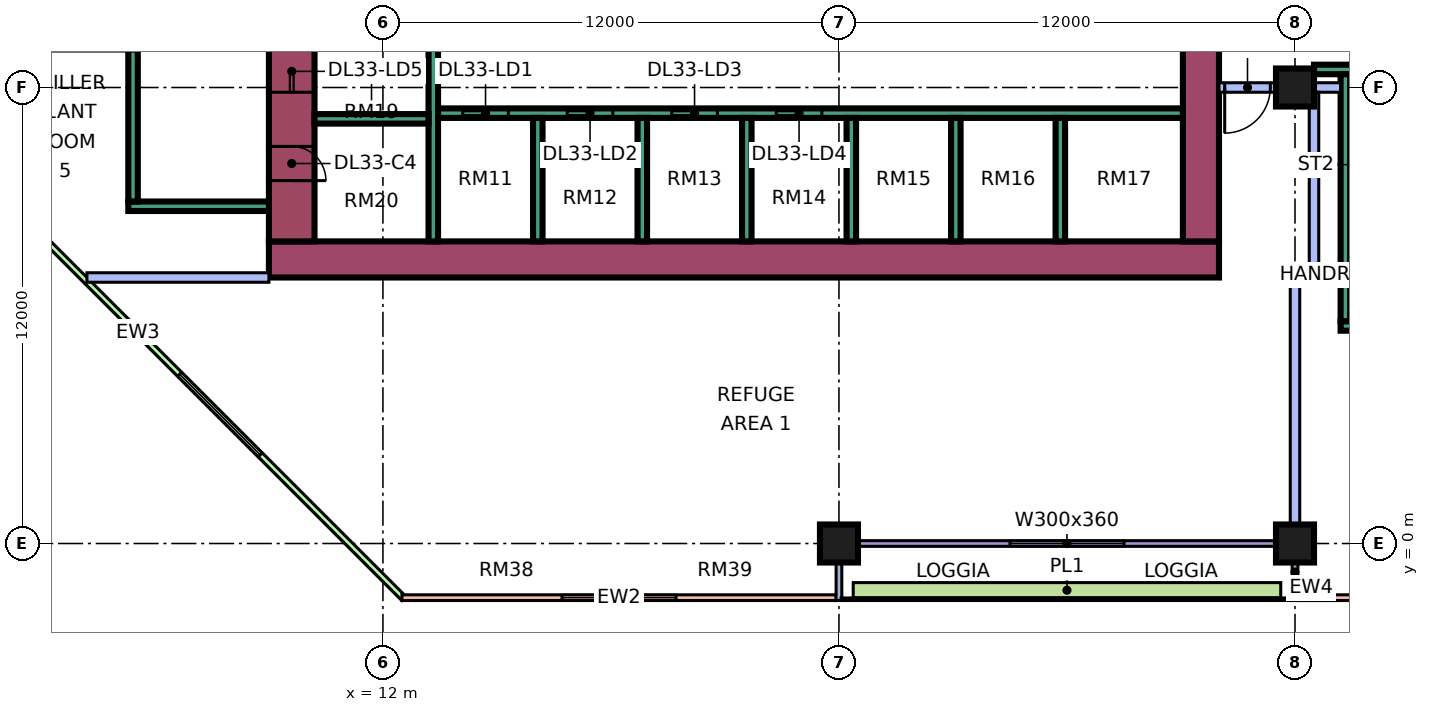
"""IFC4 building model, lengths in metres.
Left out: names, types, materials, properties, quantities, classifications, styles, units other than length and angle.
Written with IfcOpenShell. Run it as: python <this file> out.ifc"""

import sys

from ifc_helpers import new_model, si_unit, direction, frame, frame_2d, origin, origin_2d, place, context, subcontext, project, spatial, rectangle, extrude, element, fill, save


model = new_model("IFC4")
c1 = context("Model", 3, precision=1e-05, world=origin(), true_north=direction((0.0, 1.0)))
c2 = subcontext(c1, "Body", "Model", "MODEL_VIEW")
j1 = project(units=[si_unit("LENGTHUNIT", "METRE"), si_unit("PLANEANGLEUNIT", "RADIAN")], contexts=[c1])
p1 = place(None, origin())
s1 = spatial("IfcSite", under=j1, at=p1, CompositionType="ELEMENT")
p2 = place(p1, origin())
s2 = spatial("IfcBuilding", under=s1, at=p2, CompositionType="ELEMENT")
p3 = place(p2, frame((0.0, 0.0, 140.65)))
s3 = spatial("IfcBuildingStorey", under=s2, at=p3, CompositionType="ELEMENT", Elevation=140.65)
for number, where, z_axis, x_axis in (
    (1, (24.0, 0.0, 0.0), (0.0, 0.0, 1.0), (1.0, 0.0, 0.0)),
    (2, (36.0, 0.0, 0.0), (0.0, 0.0, 1.0), (1.0, 0.0, 0.0)),
    (3, (36.0, 12.0, 0.0), (0.0, 0.0, 1.0), (1.0, 0.0, 0.0)),
):
    element("IfcColumn", number, at=place(p3, frame(where, z_axis=z_axis, x_axis=x_axis)), inside=s3, PredefinedType="COLUMN", context=c2, shape_type="SweptSolid", body=[
        extrude(rectangle(XDim=1.0, YDim=1.0, at=origin_2d()), origin(), (0.0, 0.0, 1.0), 5.5),
    ])
p4 = place(p3, frame((9.0, 7.475, 0.0), z_axis=(0.0, 0.0, 1.0), x_axis=(1.0, 0.0, 0.0)))
e4 = element("IfcWall", 4, at=p4, inside=s3, PredefinedType="SHEAR", context=c2, shape_type="SweptSolid", body=[
    extrude(rectangle(XDim=25.0, YDim=0.95, at=frame_2d((12.5, 0.0))), origin(), (0.0, 0.0, 1.0), 5.5),
])
p5 = place(p3, frame((9.6, 7.95, 0.0), z_axis=(0.0, 0.0, 1.0), x_axis=(0.0, 1.0, 0.0)))
e5 = element("IfcWall", 5, at=p5, inside=s3, PredefinedType="SHEAR", context=c2, shape_type="SweptSolid", body=[
    extrude(rectangle(XDim=11.1, YDim=1.2, at=frame_2d((5.55, 0.0))), origin(), (0.0, 0.0, 1.0), 5.5),
])
p6 = place(p5, frame((3.925, 0.0, 0.0)))
e6 = element("IfcOpeningElement", 6, at=p6, cuts=e5, PredefinedType="OPENING", context=c2, shape_type="SweptSolid", body=[
    extrude(rectangle(XDim=1.1, YDim=2.2, at=frame_2d((0.55, 1.1))), frame((0.0, 0.61, 0.0), z_axis=(0.0, -1.0, 0.0), x_axis=(1.0, 0.0, 0.0)), (0.0, 0.0, 1.0), 1.22),
])
p7 = place(p5, frame((6.425, 0.0, 0.0)))
e7 = element("IfcOpeningElement", 7, at=p7, cuts=e5, PredefinedType="OPENING", context=c2, shape_type="SweptSolid", body=[
    extrude(rectangle(XDim=1.1, YDim=2.2, at=frame_2d((0.55, 1.1))), frame((0.0, 0.61, 0.0), z_axis=(0.0, -1.0, 0.0), x_axis=(1.0, 0.0, 0.0)), (0.0, 0.0, 1.0), 1.22),
])
p8 = place(p5, frame((9.175, 0.0, 0.0)))
e8 = element("IfcOpeningElement", 8, at=p8, cuts=e5, PredefinedType="OPENING", context=c2, shape_type="SweptSolid", body=[
    extrude(rectangle(XDim=1.1, YDim=2.2, at=frame_2d((0.55, 1.1))), frame((0.0, 0.61, 0.0), z_axis=(0.0, -1.0, 0.0), x_axis=(1.0, 0.0, 0.0)), (0.0, 0.0, 1.0), 1.22),
])
p9 = place(p5, frame((1.6, 0.0, 0.0)))
e9 = element("IfcOpeningElement", 9, at=p9, cuts=e5, PredefinedType="OPENING", context=c2, shape_type="SweptSolid", body=[
    extrude(rectangle(XDim=0.9, YDim=2.1, at=frame_2d((0.45, 1.05))), frame((0.0, 0.61, 0.0), z_axis=(0.0, -1.0, 0.0), x_axis=(1.0, 0.0, 0.0)), (0.0, 0.0, 1.0), 1.22),
])
p10 = place(p3, frame((33.525, 7.95, 0.0), z_axis=(0.0, 0.0, 1.0), x_axis=(0.0, 1.0, 0.0)))
e10 = element("IfcWall", 10, at=p10, inside=s3, PredefinedType="SHEAR", context=c2, shape_type="SweptSolid", body=[
    extrude(rectangle(XDim=11.1, YDim=0.95, at=frame_2d((5.55, 0.0))), origin(), (0.0, 0.0, 1.0), 5.5),
])
p11 = place(p10, frame((5.25, 0.0, 0.0)))
e11 = element("IfcOpeningElement", 11, at=p11, cuts=e10, PredefinedType="OPENING", context=c2, shape_type="SweptSolid", body=[
    extrude(rectangle(XDim=1.8, YDim=2.4, at=frame_2d((0.9, 1.2))), frame((0.0, 0.485, 0.0), z_axis=(0.0, -1.0, 0.0), x_axis=(1.0, 0.0, 0.0)), (0.0, 0.0, 1.0), 0.97),
])
p12 = place(p3, frame((13.325, 7.95, 0.0), z_axis=(0.0, 0.0, 1.0), x_axis=(0.0, 1.0, 0.0)))
e12 = element("IfcWall", 12, at=p12, inside=s3, PredefinedType="SHEAR", context=c2, shape_type="SweptSolid", body=[
    extrude(rectangle(XDim=11.1, YDim=0.25, at=frame_2d((5.55, 0.0))), origin(), (0.0, 0.0, 1.0), 5.5),
])
p13 = place(p3, frame((13.45, 11.325, 0.0), z_axis=(0.0, 0.0, 1.0), x_axis=(1.0, 0.0, 0.0)))
e13 = element("IfcWall", 13, at=p13, inside=s3, PredefinedType="SHEAR", context=c2, shape_type="SweptSolid", body=[
    extrude(rectangle(XDim=19.6, YDim=0.25, at=frame_2d((9.8, 0.0))), origin(), (0.0, 0.0, 1.0), 5.5),
])
p14 = place(p13, frame((0.65, 0.0, 0.0)))
e14 = element("IfcOpeningElement", 14, at=p14, cuts=e13, PredefinedType="OPENING", context=c2, shape_type="SweptSolid", body=[
    extrude(rectangle(XDim=1.2, YDim=2.2, at=frame_2d((0.6, 1.1))), frame((0.0, 0.135, 0.0), z_axis=(0.0, -1.0, 0.0), x_axis=(1.0, 0.0, 0.0)), (0.0, 0.0, 1.0), 0.27),
])
p15 = place(p13, frame((3.4, 0.0, 0.0)))
e15 = element("IfcOpeningElement", 15, at=p15, cuts=e13, PredefinedType="OPENING", context=c2, shape_type="SweptSolid", body=[
    extrude(rectangle(XDim=1.2, YDim=2.2, at=frame_2d((0.6, 1.1))), frame((0.0, 0.135, 0.0), z_axis=(0.0, -1.0, 0.0), x_axis=(1.0, 0.0, 0.0)), (0.0, 0.0, 1.0), 0.27),
])
p16 = place(p13, frame((6.15, 0.0, 0.0)))
e16 = element("IfcOpeningElement", 16, at=p16, cuts=e13, PredefinedType="OPENING", context=c2, shape_type="SweptSolid", body=[
    extrude(rectangle(XDim=1.2, YDim=2.2, at=frame_2d((0.6, 1.1))), frame((0.0, 0.135, 0.0), z_axis=(0.0, -1.0, 0.0), x_axis=(1.0, 0.0, 0.0)), (0.0, 0.0, 1.0), 0.27),
])
p17 = place(p13, frame((8.9, 0.0, 0.0)))
e17 = element("IfcOpeningElement", 17, at=p17, cuts=e13, PredefinedType="OPENING", context=c2, shape_type="SweptSolid", body=[
    extrude(rectangle(XDim=1.2, YDim=2.2, at=frame_2d((0.6, 1.1))), frame((0.0, 0.135, 0.0), z_axis=(0.0, -1.0, 0.0), x_axis=(1.0, 0.0, 0.0)), (0.0, 0.0, 1.0), 0.27),
])
p18 = place(p3, frame((10.2, 11.175, 0.0), z_axis=(0.0, 0.0, 1.0), x_axis=(1.0, 0.0, 0.0)))
e18 = element("IfcWall", 18, at=p18, inside=s3, PredefinedType="SHEAR", context=c2, shape_type="SweptSolid", body=[
    extrude(rectangle(XDim=3.0, YDim=0.25, at=frame_2d((1.5, 0.0))), origin(), (0.0, 0.0, 1.0), 5.5),
])
for number, where, z_axis, x_axis in (
    (19, (16.075, 7.95, 0.0), (0.0, 0.0, 1.0), (0.0, 1.0, 0.0)),
    (20, (18.825, 7.95, 0.0), (0.0, 0.0, 1.0), (0.0, 1.0, 0.0)),
    (21, (21.575, 7.95, 0.0), (0.0, 0.0, 1.0), (0.0, 1.0, 0.0)),
    (22, (24.325, 7.95, 0.0), (0.0, 0.0, 1.0), (0.0, 1.0, 0.0)),
    (23, (27.075, 7.95, 0.0), (0.0, 0.0, 1.0), (0.0, 1.0, 0.0)),
    (24, (29.825, 7.95, 0.0), (0.0, 0.0, 1.0), (0.0, 1.0, 0.0)),
):
    element("IfcWall", number, at=place(p3, frame(where, z_axis=z_axis, x_axis=x_axis)), inside=s3, PredefinedType="SHEAR", context=c2, shape_type="SweptSolid", body=[
        extrude(rectangle(XDim=3.25, YDim=0.25, at=frame_2d((1.625, 0.0))), origin(), (0.0, 0.0, 1.0), 5.5),
    ])
p19 = place(p3, frame((5.3, 8.875, 0.0), z_axis=(0.0, 0.0, 1.0), x_axis=(1.0, 0.0, 0.0)))
e25 = element("IfcWall", 25, at=p19, inside=s3, PredefinedType="SHEAR", context=c2, shape_type="SweptSolid", body=[
    extrude(rectangle(XDim=3.7, YDim=0.25, at=frame_2d((1.85, 0.0))), origin(), (0.0, 0.0, 1.0), 5.5),
])
p20 = place(p3, frame((5.425, 9.0, 0.0), z_axis=(0.0, 0.0, 1.0), x_axis=(0.0, 1.0, 0.0)))
e26 = element("IfcWall", 26, at=p20, inside=s3, PredefinedType="SHEAR", context=c2, shape_type="SweptSolid", body=[
    extrude(rectangle(XDim=4.0, YDim=0.25, at=frame_2d((2.0, 0.0))), origin(), (0.0, 0.0, 1.0), 5.5),
])
p21 = place(p3, frame((37.2, 5.725, 0.0), z_axis=(0.0, 0.0, 1.0), x_axis=(1.0, 0.0, 0.0)))
e27 = element("IfcWall", 27, at=p21, inside=s3, PredefinedType="SHEAR", context=c2, shape_type="SweptSolid", body=[
    extrude(rectangle(XDim=3.45, YDim=0.25, at=frame_2d((1.725, 0.0))), origin(), (0.0, 0.0, 1.0), 5.5),
])
p22 = place(p3, frame((36.5, 12.475, 0.0), z_axis=(0.0, 0.0, 1.0), x_axis=(1.0, 0.0, 0.0)))
e28 = element("IfcWall", 28, at=p22, inside=s3, PredefinedType="SHEAR", context=c2, shape_type="SweptSolid", body=[
    extrude(rectangle(XDim=4.15, YDim=0.25, at=frame_2d((2.075, 0.0))), origin(), (0.0, 0.0, 1.0), 5.5),
])
p23 = place(p22, frame((1.875, 0.0, 0.0)))
e29 = element("IfcOpeningElement", 29, at=p23, cuts=e28, PredefinedType="OPENING", context=c2, shape_type="SweptSolid", body=[
    extrude(rectangle(XDim=1.1, YDim=2.2, at=frame_2d((0.55, 1.1))), frame((0.0, 0.135, 0.0), z_axis=(0.0, -1.0, 0.0), x_axis=(1.0, 0.0, 0.0)), (0.0, 0.0, 1.0), 0.27),
])
p24 = place(p3, frame((37.325, 5.85, 0.0), z_axis=(0.0, 0.0, 1.0), x_axis=(0.0, 1.0, 0.0)))
e30 = element("IfcWall", 30, at=p24, inside=s3, PredefinedType="SHEAR", context=c2, shape_type="SweptSolid", body=[
    extrude(rectangle(XDim=6.5, YDim=0.25, at=frame_2d((3.25, 0.0))), origin(), (0.0, 0.0, 1.0), 5.5),
])
p25 = place(p3, frame((-1.447, 12.553, 0.0), z_axis=(0.0, 0.0, 1.0), x_axis=(0.707106781187, -0.707106781187, 0.0)))
e31 = element("IfcWall", 31, at=p25, inside=s3, PredefinedType="SOLIDWALL", context=c2, shape_type="SweptSolid", body=[
    extrude(rectangle(XDim=19.799, YDim=0.15, at=frame_2d((9.899, 0.0))), origin(), (0.0, 0.0, 1.0), 5.05),
])
p26 = place(p25, frame((11.453, 0.0, 0.45)))
e32 = element("IfcOpeningElement", 32, at=p26, cuts=e31, PredefinedType="OPENING", context=c2, shape_type="SweptSolid", body=[
    extrude(rectangle(XDim=3.0, YDim=3.6, at=frame_2d((1.5, 1.8))), frame((0.0, 0.085, 0.0), z_axis=(0.0, -1.0, 0.0), x_axis=(1.0, 0.0, 0.0)), (0.0, 0.0, 1.0), 0.17),
])
p27 = place(p3, frame((12.5, -1.425, 0.0), z_axis=(0.0, 0.0, 1.0), x_axis=(1.0, 0.0, 0.0)))
e33 = element("IfcWall", 33, at=p27, inside=s3, PredefinedType="SOLIDWALL", context=c2, shape_type="SweptSolid", body=[
    extrude(rectangle(XDim=11.425, YDim=0.15, at=frame_2d((5.712, 0.0))), origin(), (0.0, 0.0, 1.0), 5.05),
])
p28 = place(p27, frame((4.212, 0.0, 0.45)))
e34 = element("IfcOpeningElement", 34, at=p28, cuts=e33, PredefinedType="OPENING", context=c2, shape_type="SweptSolid", body=[
    extrude(rectangle(XDim=3.0, YDim=3.6, at=frame_2d((1.5, 1.8))), frame((0.0, 0.085, 0.0), z_axis=(0.0, -1.0, 0.0), x_axis=(1.0, 0.0, 0.0)), (0.0, 0.0, 1.0), 0.17),
])
p29 = place(p3, frame((24.075, 0.0, 0.0), z_axis=(0.0, 0.0, 1.0), x_axis=(1.0, 0.0, 0.0)))
e35 = element("IfcWall", 35, at=p29, inside=s3, PredefinedType="SOLIDWALL", context=c2, shape_type="SweptSolid", body=[
    extrude(rectangle(XDim=11.85, YDim=0.15, at=frame_2d((5.925, 0.0))), origin(), (0.0, 0.0, 1.0), 5.05),
])
p30 = place(p29, frame((4.425, 0.0, 0.45)))
e36 = element("IfcOpeningElement", 36, at=p30, cuts=e35, PredefinedType="OPENING", context=c2, shape_type="SweptSolid", body=[
    extrude(rectangle(XDim=3.0, YDim=3.6, at=frame_2d((1.5, 1.8))), frame((0.0, 0.085, 0.0), z_axis=(0.0, -1.0, 0.0), x_axis=(1.0, 0.0, 0.0)), (0.0, 0.0, 1.0), 0.17),
])
for number, where, z_axis, x_axis in (
    (37, (24.0, -1.5, 0.0), (0.0, 0.0, 1.0), (0.0, 1.0, 0.0)),
    (38, (36.0, -1.5, 0.0), (0.0, 0.0, 1.0), (0.0, 1.0, 0.0)),
):
    element("IfcWall", number, at=place(p3, frame(where, z_axis=z_axis, x_axis=x_axis)), inside=s3, PredefinedType="SOLIDWALL", context=c2, shape_type="SweptSolid", body=[
        extrude(rectangle(XDim=1.5, YDim=0.15, at=frame_2d((0.75, 0.0))), origin(), (0.0, 0.0, 1.0), 5.05),
    ])
p31 = place(p3, frame((36.075, -1.425, 0.0), z_axis=(0.0, 0.0, 1.0), x_axis=(1.0, 0.0, 0.0)))
e39 = element("IfcWall", 39, at=p31, inside=s3, PredefinedType="SOLIDWALL", context=c2, shape_type="SweptSolid", body=[
    extrude(rectangle(XDim=11.85, YDim=0.15, at=frame_2d((5.925, 0.0))), origin(), (0.0, 0.0, 1.0), 5.05),
])
p32 = place(p31, frame((2.962, 0.0, 0.45)))
e40 = element("IfcOpeningElement", 40, at=p32, cuts=e39, PredefinedType="OPENING", context=c2, shape_type="SweptSolid", body=[
    extrude(rectangle(XDim=3.0, YDim=3.6, at=frame_2d((1.5, 1.8))), frame((0.0, 0.085, 0.0), z_axis=(0.0, -1.0, 0.0), x_axis=(1.0, 0.0, 0.0)), (0.0, 0.0, 1.0), 0.17),
])
p33 = place(p31, frame((9.488, 0.0, 0.45)))
e41 = element("IfcOpeningElement", 41, at=p33, cuts=e39, PredefinedType="OPENING", context=c2, shape_type="SweptSolid", body=[
    extrude(rectangle(XDim=1.8, YDim=3.6, at=frame_2d((0.9, 1.8))), frame((0.0, 0.085, 0.0), z_axis=(0.0, -1.0, 0.0), x_axis=(1.0, 0.0, 0.0)), (0.0, 0.0, 1.0), 0.17),
])
p34 = place(p3, frame((24.375, -1.229, 0.0), z_axis=(0.0, 0.0, 1.0), x_axis=(1.0, 0.0, 0.0)))
e42 = element("IfcWall", 42, at=p34, inside=s3, PredefinedType="SOLIDWALL", context=c2, shape_type="SweptSolid", body=[
    extrude(rectangle(XDim=11.25, YDim=0.4, at=frame_2d((5.625, 0.0))), origin(), (0.0, 0.0, 1.0), 0.7),
])
p35 = place(p3, frame((4.211, 7.0, 0.0), z_axis=(0.0, 0.0, 1.0), x_axis=(1.0, 0.0, 0.0)))
e43 = element("IfcWall", 43, at=p35, inside=s3, PredefinedType="PARTITIONING", context=c2, shape_type="SweptSolid", body=[
    extrude(rectangle(XDim=4.789, YDim=0.25, at=frame_2d((2.395, 0.0))), origin(), (0.0, 0.0, 1.0), 5.05),
])
p36 = place(p3, frame((34.0, 12.0, 0.0), z_axis=(0.0, 0.0, 1.0), x_axis=(1.0, 0.0, 0.0)))
e44 = element("IfcWall", 44, at=p36, inside=s3, PredefinedType="PARTITIONING", context=c2, shape_type="SweptSolid", body=[
    extrude(rectangle(XDim=3.2, YDim=0.25, at=frame_2d((1.6, 0.0))), origin(), (0.0, 0.0, 1.0), 5.05),
])
p37 = place(p36, frame((0.15, 0.0, 0.0)))
e45 = element("IfcOpeningElement", 45, at=p37, cuts=e44, PredefinedType="OPENING", context=c2, shape_type="SweptSolid", body=[
    extrude(rectangle(XDim=1.2, YDim=2.1, at=frame_2d((0.6, 1.05))), frame((0.0, 0.135, 0.0), z_axis=(0.0, -1.0, 0.0), x_axis=(1.0, 0.0, 0.0)), (0.0, 0.0, 1.0), 0.27),
])
p38 = place(p3, frame((36.0, 0.0, 0.0), z_axis=(0.0, 0.0, 1.0), x_axis=(0.0, 1.0, 0.0)))
e46 = element("IfcWall", 46, at=p38, inside=s3, PredefinedType="PARTITIONING", context=c2, shape_type="SweptSolid", body=[
    extrude(rectangle(XDim=7.125, YDim=0.25, at=frame_2d((3.562, 0.0))), origin(), (0.0, 0.0, 1.0), 5.05),
])
p39 = place(p3, frame((36.125, 7.0, 0.0), z_axis=(0.0, 0.0, 1.0), x_axis=(1.0, 0.0, 0.0)))
e47 = element("IfcWall", 47, at=p39, inside=s3, PredefinedType="PARTITIONING", context=c2, shape_type="SweptSolid", body=[
    extrude(rectangle(XDim=0.25, YDim=0.25, at=frame_2d((0.125, 0.0))), origin(), (0.0, 0.0, 1.0), 5.05),
])
p40 = place(p3, frame((36.5, 6.875, 0.0), z_axis=(0.0, 0.0, 1.0), x_axis=(0.0, 1.0, 0.0)))
e48 = element("IfcWall", 48, at=p40, inside=s3, PredefinedType="PARTITIONING", context=c2, shape_type="SweptSolid", body=[
    extrude(rectangle(XDim=5.0, YDim=0.25, at=frame_2d((2.5, 0.0))), origin(), (0.0, 0.0, 1.0), 5.05),
])
p41 = place(p26, origin())
e49 = element("IfcWindow", 49, at=p41, inside=s3, PartitioningType="SINGLE_PANEL", PredefinedType="WINDOW", context=c2, shape_type="SweptSolid", body=[
    extrude(rectangle(XDim=3.0, YDim=3.6, at=frame_2d((1.5, 1.8))), frame((0.0, 0.03, 0.0), z_axis=(0.0, -1.0, 0.0), x_axis=(1.0, 0.0, 0.0)), (0.0, 0.0, 1.0), 0.06),
])
fill(e32, e49)
p42 = place(p28, origin())
e50 = element("IfcWindow", 50, at=p42, inside=s3, PartitioningType="SINGLE_PANEL", PredefinedType="WINDOW", context=c2, shape_type="SweptSolid", body=[
    extrude(rectangle(XDim=3.0, YDim=3.6, at=frame_2d((1.5, 1.8))), frame((0.0, 0.03, 0.0), z_axis=(0.0, -1.0, 0.0), x_axis=(1.0, 0.0, 0.0)), (0.0, 0.0, 1.0), 0.06),
])
fill(e34, e50)
p43 = place(p30, origin())
e51 = element("IfcWindow", 51, at=p43, inside=s3, PartitioningType="SINGLE_PANEL", PredefinedType="WINDOW", context=c2, shape_type="SweptSolid", body=[
    extrude(rectangle(XDim=3.0, YDim=3.6, at=frame_2d((1.5, 1.8))), frame((0.0, 0.03, 0.0), z_axis=(0.0, -1.0, 0.0), x_axis=(1.0, 0.0, 0.0)), (0.0, 0.0, 1.0), 0.06),
])
fill(e36, e51)
p44 = place(p14, origin())
e52 = element("IfcDoor", 52, at=p44, inside=s3, OperationType="DOUBLE_DOOR_SLIDING", PredefinedType="DOOR", context=c2, shape_type="SweptSolid", body=[
    extrude(rectangle(XDim=1.2, YDim=2.2, at=frame_2d((0.6, 1.1))), frame((0.0, 0.025, 0.0), z_axis=(0.0, -1.0, 0.0), x_axis=(1.0, 0.0, 0.0)), (0.0, 0.0, 1.0), 0.05),
])
fill(e14, e52)
p45 = place(p15, origin())
e53 = element("IfcDoor", 53, at=p45, inside=s3, OperationType="DOUBLE_DOOR_SLIDING", PredefinedType="DOOR", context=c2, shape_type="SweptSolid", body=[
    extrude(rectangle(XDim=1.2, YDim=2.2, at=frame_2d((0.6, 1.1))), frame((0.0, 0.025, 0.0), z_axis=(0.0, -1.0, 0.0), x_axis=(1.0, 0.0, 0.0)), (0.0, 0.0, 1.0), 0.05),
])
fill(e15, e53)
p46 = place(p16, origin())
e54 = element("IfcDoor", 54, at=p46, inside=s3, OperationType="DOUBLE_DOOR_SLIDING", PredefinedType="DOOR", context=c2, shape_type="SweptSolid", body=[
    extrude(rectangle(XDim=1.2, YDim=2.2, at=frame_2d((0.6, 1.1))), frame((0.0, 0.025, 0.0), z_axis=(0.0, -1.0, 0.0), x_axis=(1.0, 0.0, 0.0)), (0.0, 0.0, 1.0), 0.05),
])
fill(e16, e54)
p47 = place(p17, origin())
e55 = element("IfcDoor", 55, at=p47, inside=s3, OperationType="DOUBLE_DOOR_SLIDING", PredefinedType="DOOR", context=c2, shape_type="SweptSolid", body=[
    extrude(rectangle(XDim=1.2, YDim=2.2, at=frame_2d((0.6, 1.1))), frame((0.0, 0.025, 0.0), z_axis=(0.0, -1.0, 0.0), x_axis=(1.0, 0.0, 0.0)), (0.0, 0.0, 1.0), 0.05),
])
fill(e17, e55)
p48 = place(p6, origin())
e56 = element("IfcDoor", 56, at=p48, inside=s3, OperationType="DOUBLE_DOOR_SLIDING", PredefinedType="DOOR", context=c2, shape_type="SweptSolid", body=[
    extrude(rectangle(XDim=1.1, YDim=2.2, at=frame_2d((0.55, 1.1))), frame((0.0, 0.025, 0.0), z_axis=(0.0, -1.0, 0.0), x_axis=(1.0, 0.0, 0.0)), (0.0, 0.0, 1.0), 0.05),
])
fill(e6, e56)
p49 = place(p9, frame((0.9, 0.0, 0.0), z_axis=(0.0, 0.0, 1.0), x_axis=(-1.0, 0.0, 0.0)))
e57 = element("IfcDoor", 57, at=p49, inside=s3, OperationType="SINGLE_SWING_LEFT", PredefinedType="DOOR", context=c2, shape_type="SweptSolid", body=[
    extrude(rectangle(XDim=0.9, YDim=2.1, at=frame_2d((0.45, 1.05))), frame((0.0, 0.025, 0.0), z_axis=(0.0, -1.0, 0.0), x_axis=(1.0, 0.0, 0.0)), (0.0, 0.0, 1.0), 0.05),
])
fill(e9, e57)
p50 = place(p37, frame((1.2, 0.0, 0.0), z_axis=(0.0, 0.0, 1.0), x_axis=(-1.0, 0.0, 0.0)))
e58 = element("IfcDoor", 58, at=p50, inside=s3, OperationType="SINGLE_SWING_LEFT", PredefinedType="DOOR", context=c2, shape_type="SweptSolid", body=[
    extrude(rectangle(XDim=1.2, YDim=2.1, at=frame_2d((0.6, 1.05))), frame((0.0, 0.025, 0.0), z_axis=(0.0, -1.0, 0.0), x_axis=(1.0, 0.0, 0.0)), (0.0, 0.0, 1.0), 0.05),
])
fill(e45, e58)
save(model, sys.argv[1])
